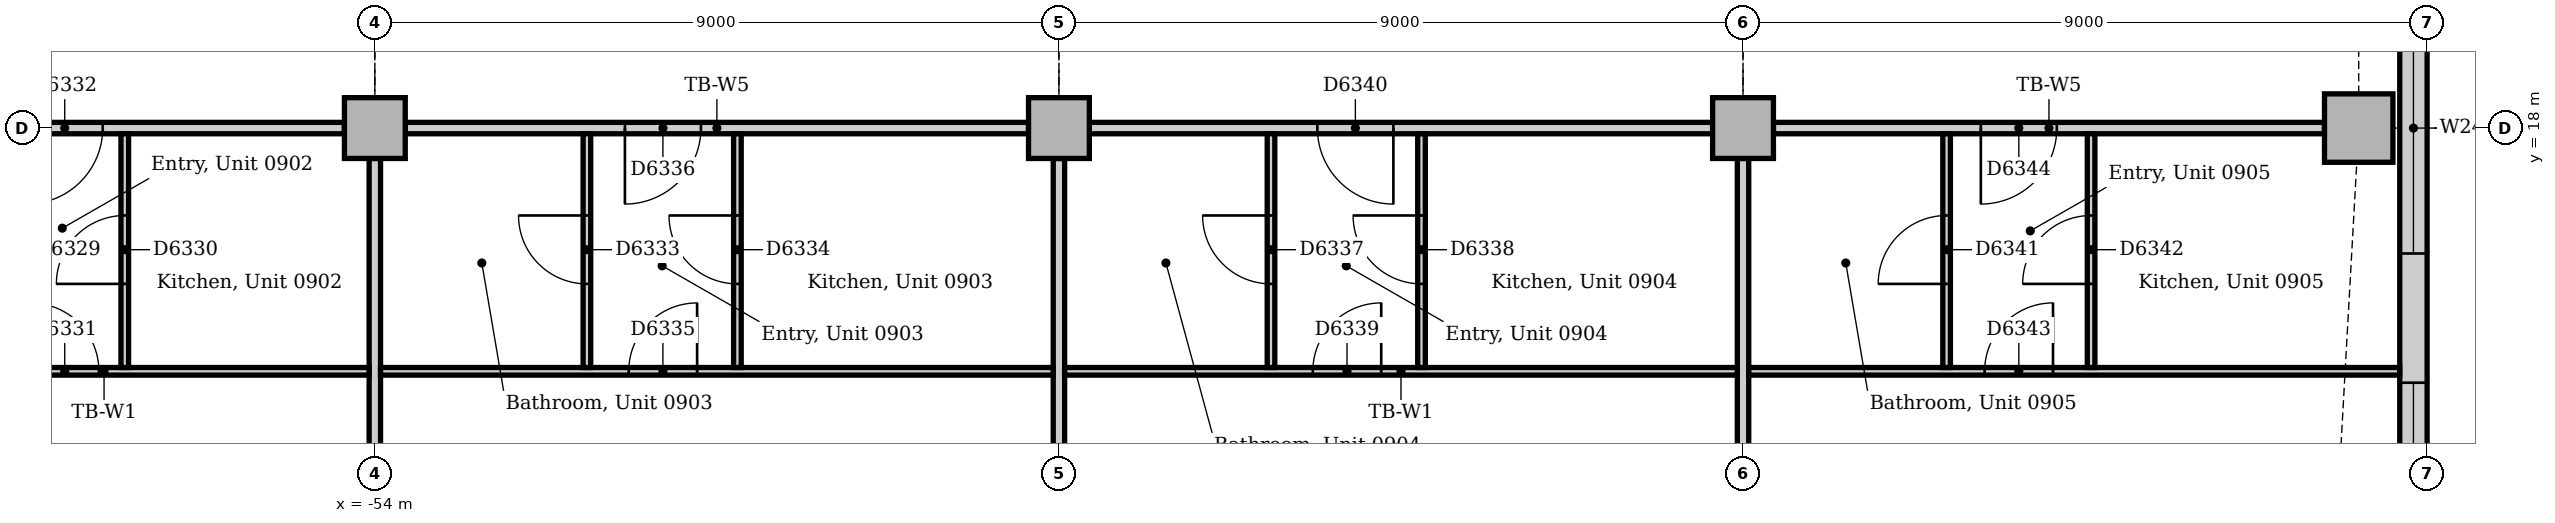
"""IFC4 building model, lengths in metres.
Left out: names, types, materials, properties, quantities, classifications, styles, units other than length and angle.
Written with IfcOpenShell. Run it as: python <this file> out.ifc"""

import sys

from ifc_helpers import new_model, si_unit, direction, frame, frame_2d, origin, origin_2d, place, context, subcontext, project, spatial, rectangle, extrude, element, fill, save


model = new_model("IFC4")
c1 = context("Model", 3, precision=1e-05, world=origin(), true_north=direction((0.0, 1.0)))
c2 = subcontext(c1, "Body", "Model", "MODEL_VIEW")
j1 = project(units=[si_unit("LENGTHUNIT", "METRE"), si_unit("PLANEANGLEUNIT", "RADIAN")], contexts=[c1])
p1 = place(None, origin())
s1 = spatial("IfcSite", under=j1, at=p1, CompositionType="ELEMENT")
p2 = place(p1, origin())
s2 = spatial("IfcBuilding", under=s1, at=p2, CompositionType="ELEMENT")
p3 = place(p2, frame((0.0, 0.0, 42.0)))
s3 = spatial("IfcBuildingStorey", under=s2, at=p3, CompositionType="ELEMENT", Elevation=42.0)
p4 = place(p3, frame((-27.9, 18.0, 0.0), z_axis=(0.0, 0.0, 1.0), x_axis=(1.0, 0.0, 0.0)))
e1 = element("IfcColumn", 1, at=p4, inside=s3, PredefinedType="COLUMN", context=c2, shape_type="SweptSolid", body=[
    extrude(rectangle(XDim=0.9, YDim=0.9, at=origin_2d()), origin(), (0.0, 0.0, 1.0), 3.7),
])
for number, where, z_axis, x_axis in (
    (2, (-54.0, 18.0, 0.0), (0.0, 0.0, 1.0), (1.0, 0.0, 0.0)),
    (3, (-45.0, 18.0, 0.0), (0.0, 0.0, 1.0), (1.0, 0.0, 0.0)),
    (4, (-36.0, 18.0, 0.0), (0.0, 0.0, 1.0), (1.0, 0.0, 0.0)),
):
    element("IfcColumn", number, at=place(p3, frame(where, z_axis=z_axis, x_axis=x_axis)), inside=s3, PredefinedType="COLUMN", context=c2, shape_type="SweptSolid", body=[
        extrude(rectangle(XDim=0.8, YDim=0.8, at=origin_2d()), origin(), (0.0, 0.0, 1.0), 3.7),
    ])
p5 = place(p3, frame((-27.18, 8.743, 0.0), z_axis=(0.0, 0.0, 1.0), x_axis=(0.0, 1.0, 0.0)))
e5 = element("IfcWall", 5, at=p5, inside=s3, PredefinedType="STANDARD", context=c2, shape_type="SweptSolid", body=[
    extrude(rectangle(XDim=12.257, YDim=0.36, at=frame_2d((6.129, 0.0))), origin(), (0.0, 0.0, 1.0), 3.7),
])
p6 = place(p5, frame((2.607, 0.0, 0.9)))
e6 = element("IfcOpeningElement", 6, at=p6, cuts=e5, PredefinedType="OPENING", context=c2, shape_type="SweptSolid", body=[
    extrude(rectangle(XDim=3.3, YDim=1.6, at=frame_2d((1.65, 0.8))), frame((0.0, 0.19, 0.0), z_axis=(0.0, -1.0, 0.0), x_axis=(1.0, 0.0, 0.0)), (0.0, 0.0, 1.0), 0.38),
])
p7 = place(p5, frame((7.607, 0.0, 0.9)))
e7 = element("IfcOpeningElement", 7, at=p7, cuts=e5, PredefinedType="OPENING", context=c2, shape_type="SweptSolid", body=[
    extrude(rectangle(XDim=3.3, YDim=1.6, at=frame_2d((1.65, 0.8))), frame((0.0, 0.19, 0.0), z_axis=(0.0, -1.0, 0.0), x_axis=(1.0, 0.0, 0.0)), (0.0, 0.0, 1.0), 0.38),
])
p8 = place(p3, frame((-35.6, 18.0, 0.0), z_axis=(0.0, 0.0, 1.0), x_axis=(1.0, 0.0, 0.0)))
e8 = element("IfcWall", 8, at=p8, inside=s3, PredefinedType="PARTITIONING", context=c2, shape_type="SweptSolid", body=[
    extrude(rectangle(XDim=7.25, YDim=0.15, at=frame_2d((3.625, 0.0))), origin(), (0.0, 0.0, 1.0), 3.0),
])
p9 = place(p8, frame((2.728, 0.0, 0.0)))
e9 = element("IfcOpeningElement", 9, at=p9, cuts=e8, PredefinedType="OPENING", context=c2, shape_type="SweptSolid", body=[
    extrude(rectangle(XDim=1.0, YDim=2.1, at=frame_2d((0.5, 1.05))), frame((0.0, 0.085, 0.0), z_axis=(0.0, -1.0, 0.0), x_axis=(1.0, 0.0, 0.0)), (0.0, 0.0, 1.0), 0.17),
])
p10 = place(p3, frame((-44.6, 18.0, 0.0), z_axis=(0.0, 0.0, 1.0), x_axis=(1.0, 0.0, 0.0)))
e10 = element("IfcWall", 10, at=p10, inside=s3, PredefinedType="PARTITIONING", context=c2, shape_type="SweptSolid", body=[
    extrude(rectangle(XDim=8.2, YDim=0.15, at=frame_2d((4.1, 0.0))), origin(), (0.0, 0.0, 1.0), 3.0),
])
p11 = place(p10, frame((3.0, 0.0, 0.0)))
e11 = element("IfcOpeningElement", 11, at=p11, cuts=e10, PredefinedType="OPENING", context=c2, shape_type="SweptSolid", body=[
    extrude(rectangle(XDim=1.0, YDim=2.1, at=frame_2d((0.5, 1.05))), frame((0.0, 0.085, 0.0), z_axis=(0.0, -1.0, 0.0), x_axis=(1.0, 0.0, 0.0)), (0.0, 0.0, 1.0), 0.17),
])
p12 = place(p3, frame((-53.6, 18.0, 0.0), z_axis=(0.0, 0.0, 1.0), x_axis=(1.0, 0.0, 0.0)))
e12 = element("IfcWall", 12, at=p12, inside=s3, PredefinedType="PARTITIONING", context=c2, shape_type="SweptSolid", body=[
    extrude(rectangle(XDim=8.2, YDim=0.15, at=frame_2d((4.1, 0.0))), origin(), (0.0, 0.0, 1.0), 3.0),
])
p13 = place(p12, frame((2.89, 0.0, 0.0)))
e13 = element("IfcOpeningElement", 13, at=p13, cuts=e12, PredefinedType="OPENING", context=c2, shape_type="SweptSolid", body=[
    extrude(rectangle(XDim=1.0, YDim=2.1, at=frame_2d((0.5, 1.05))), frame((0.0, 0.085, 0.0), z_axis=(0.0, -1.0, 0.0), x_axis=(1.0, 0.0, 0.0)), (0.0, 0.0, 1.0), 0.17),
])
p14 = place(p3, frame((-62.6, 18.0, 0.0), z_axis=(0.0, 0.0, 1.0), x_axis=(1.0, 0.0, 0.0)))
e14 = element("IfcWall", 14, at=p14, inside=s3, PredefinedType="PARTITIONING", context=c2, shape_type="SweptSolid", body=[
    extrude(rectangle(XDim=8.2, YDim=0.15, at=frame_2d((4.1, 0.0))), origin(), (0.0, 0.0, 1.0), 3.0),
])
p15 = place(p14, frame((0.4, 0.0, 0.0)))
e15 = element("IfcOpeningElement", 15, at=p15, cuts=e14, PredefinedType="OPENING", context=c2, shape_type="SweptSolid", body=[
    extrude(rectangle(XDim=0.9, YDim=2.1, at=frame_2d((0.45, 1.05))), frame((0.0, 0.085, 0.0), z_axis=(0.0, -1.0, 0.0), x_axis=(1.0, 0.0, 0.0)), (0.0, 0.0, 1.0), 0.17),
])
p16 = place(p14, frame((4.02, 0.0, 0.0)))
e16 = element("IfcOpeningElement", 16, at=p16, cuts=e14, PredefinedType="OPENING", context=c2, shape_type="SweptSolid", body=[
    extrude(rectangle(XDim=1.0, YDim=2.1, at=frame_2d((0.5, 1.05))), frame((0.0, 0.085, 0.0), z_axis=(0.0, -1.0, 0.0), x_axis=(1.0, 0.0, 0.0)), (0.0, 0.0, 1.0), 0.17),
])
for number, where, z_axis, x_axis in (
    (17, (-54.0, 9.4, 0.0), (0.0, 0.0, 1.0), (0.0, 1.0, 0.0)),
    (18, (-45.0, 9.4, 0.0), (0.0, 0.0, 1.0), (0.0, 1.0, 0.0)),
    (19, (-36.0, 9.4, 0.0), (0.0, 0.0, 1.0), (0.0, 1.0, 0.0)),
):
    element("IfcWall", number, at=place(p3, frame(where, z_axis=z_axis, x_axis=x_axis)), inside=s3, PredefinedType="PARTITIONING", context=c2, shape_type="SweptSolid", body=[
        extrude(rectangle(XDim=8.2, YDim=0.15, at=frame_2d((4.1, 0.0))), origin(), (0.0, 0.0, 1.0), 3.008),
    ])
p17 = place(p3, frame((-61.05, 14.8, 0.0), z_axis=(0.0, 0.0, 1.0), x_axis=(1.0, 0.0, 0.0)))
e20 = element("IfcWall", 20, at=p17, inside=s3, PredefinedType="PARTITIONING", context=c2, shape_type="SweptSolid", body=[
    extrude(rectangle(XDim=6.975, YDim=0.1, at=frame_2d((3.487, 0.0))), origin(), (0.0, 0.0, 1.0), 3.7),
])
p18 = place(p17, frame((2.52, 0.0, 0.0)))
e21 = element("IfcOpeningElement", 21, at=p18, cuts=e20, PredefinedType="OPENING", context=c2, shape_type="SweptSolid", body=[
    extrude(rectangle(XDim=0.9, YDim=2.1, at=frame_2d((0.45, 1.05))), frame((0.0, 0.06, 0.0), z_axis=(0.0, -1.0, 0.0), x_axis=(1.0, 0.0, 0.0)), (0.0, 0.0, 1.0), 0.12),
])
p19 = place(p3, frame((-53.925, 14.8, 0.0), z_axis=(0.0, 0.0, 1.0), x_axis=(1.0, 0.0, 0.0)))
e22 = element("IfcWall", 22, at=p19, inside=s3, PredefinedType="PARTITIONING", context=c2, shape_type="SweptSolid", body=[
    extrude(rectangle(XDim=8.85, YDim=0.1, at=frame_2d((4.425, 0.0))), origin(), (0.0, 0.0, 1.0), 3.7),
])
p20 = place(p19, frame((3.265, 0.0, 0.0)))
e23 = element("IfcOpeningElement", 23, at=p20, cuts=e22, PredefinedType="OPENING", context=c2, shape_type="SweptSolid", body=[
    extrude(rectangle(XDim=0.9, YDim=2.1, at=frame_2d((0.45, 1.05))), frame((0.0, 0.06, 0.0), z_axis=(0.0, -1.0, 0.0), x_axis=(1.0, 0.0, 0.0)), (0.0, 0.0, 1.0), 0.12),
])
p21 = place(p3, frame((-44.925, 14.8, 0.0), z_axis=(0.0, 0.0, 1.0), x_axis=(1.0, 0.0, 0.0)))
e24 = element("IfcWall", 24, at=p21, inside=s3, PredefinedType="PARTITIONING", context=c2, shape_type="SweptSolid", body=[
    extrude(rectangle(XDim=8.85, YDim=0.1, at=frame_2d((4.425, 0.0))), origin(), (0.0, 0.0, 1.0), 3.7),
])
p22 = place(p21, frame((3.265, 0.0, 0.0)))
e25 = element("IfcOpeningElement", 25, at=p22, cuts=e24, PredefinedType="OPENING", context=c2, shape_type="SweptSolid", body=[
    extrude(rectangle(XDim=0.9, YDim=2.1, at=frame_2d((0.45, 1.05))), frame((0.0, 0.06, 0.0), z_axis=(0.0, -1.0, 0.0), x_axis=(1.0, 0.0, 0.0)), (0.0, 0.0, 1.0), 0.12),
])
p23 = place(p3, frame((-35.925, 14.8, 0.0), z_axis=(0.0, 0.0, 1.0), x_axis=(1.0, 0.0, 0.0)))
e26 = element("IfcWall", 26, at=p23, inside=s3, PredefinedType="PARTITIONING", context=c2, shape_type="SweptSolid", body=[
    extrude(rectangle(XDim=8.565, YDim=0.1, at=frame_2d((4.282, 0.0))), origin(), (0.0, 0.0, 1.0), 3.7),
])
p24 = place(p23, frame((3.103, 0.0, 0.0)))
e27 = element("IfcOpeningElement", 27, at=p24, cuts=e26, PredefinedType="OPENING", context=c2, shape_type="SweptSolid", body=[
    extrude(rectangle(XDim=0.9, YDim=2.1, at=frame_2d((0.45, 1.05))), frame((0.0, 0.06, 0.0), z_axis=(0.0, -1.0, 0.0), x_axis=(1.0, 0.0, 0.0)), (0.0, 0.0, 1.0), 0.12),
])
p25 = place(p3, frame((-57.29, 14.85, 0.0), z_axis=(0.0, 0.0, 1.0), x_axis=(0.0, 1.0, 0.0)))
e28 = element("IfcWall", 28, at=p25, inside=s3, PredefinedType="PARTITIONING", context=c2, shape_type="SweptSolid", body=[
    extrude(rectangle(XDim=3.075, YDim=0.1, at=frame_2d((1.538, 0.0))), origin(), (0.0, 0.0, 1.0), 3.7),
])
p26 = place(p25, frame((1.1, 0.0, 0.0)))
e29 = element("IfcOpeningElement", 29, at=p26, cuts=e28, PredefinedType="OPENING", context=c2, shape_type="SweptSolid", body=[
    extrude(rectangle(XDim=0.9, YDim=2.1, at=frame_2d((0.45, 1.05))), frame((0.0, 0.06, 0.0), z_axis=(0.0, -1.0, 0.0), x_axis=(1.0, 0.0, 0.0)), (0.0, 0.0, 1.0), 0.12),
])
p27 = place(p3, frame((-51.21, 14.85, 0.0), z_axis=(0.0, 0.0, 1.0), x_axis=(0.0, 1.0, 0.0)))
e30 = element("IfcWall", 30, at=p27, inside=s3, PredefinedType="PARTITIONING", context=c2, shape_type="SweptSolid", body=[
    extrude(rectangle(XDim=3.075, YDim=0.1, at=frame_2d((1.538, 0.0))), origin(), (0.0, 0.0, 1.0), 3.7),
])
p28 = place(p27, frame((1.1, 0.0, 0.0)))
e31 = element("IfcOpeningElement", 31, at=p28, cuts=e30, PredefinedType="OPENING", context=c2, shape_type="SweptSolid", body=[
    extrude(rectangle(XDim=0.9, YDim=2.1, at=frame_2d((0.45, 1.05))), frame((0.0, 0.06, 0.0), z_axis=(0.0, -1.0, 0.0), x_axis=(1.0, 0.0, 0.0)), (0.0, 0.0, 1.0), 0.12),
])
p29 = place(p3, frame((-49.23, 14.85, 0.0), z_axis=(0.0, 0.0, 1.0), x_axis=(0.0, 1.0, 0.0)))
e32 = element("IfcWall", 32, at=p29, inside=s3, PredefinedType="PARTITIONING", context=c2, shape_type="SweptSolid", body=[
    extrude(rectangle(XDim=3.075, YDim=0.1, at=frame_2d((1.538, 0.0))), origin(), (0.0, 0.0, 1.0), 3.7),
])
p30 = place(p29, frame((1.1, 0.0, 0.0)))
e33 = element("IfcOpeningElement", 33, at=p30, cuts=e32, PredefinedType="OPENING", context=c2, shape_type="SweptSolid", body=[
    extrude(rectangle(XDim=0.9, YDim=2.1, at=frame_2d((0.45, 1.05))), frame((0.0, 0.06, 0.0), z_axis=(0.0, -1.0, 0.0), x_axis=(1.0, 0.0, 0.0)), (0.0, 0.0, 1.0), 0.12),
])
p31 = place(p3, frame((-42.21, 14.85, 0.0), z_axis=(0.0, 0.0, 1.0), x_axis=(0.0, 1.0, 0.0)))
e34 = element("IfcWall", 34, at=p31, inside=s3, PredefinedType="PARTITIONING", context=c2, shape_type="SweptSolid", body=[
    extrude(rectangle(XDim=3.075, YDim=0.1, at=frame_2d((1.538, 0.0))), origin(), (0.0, 0.0, 1.0), 3.7),
])
p32 = place(p31, frame((1.1, 0.0, 0.0)))
e35 = element("IfcOpeningElement", 35, at=p32, cuts=e34, PredefinedType="OPENING", context=c2, shape_type="SweptSolid", body=[
    extrude(rectangle(XDim=0.9, YDim=2.1, at=frame_2d((0.45, 1.05))), frame((0.0, 0.06, 0.0), z_axis=(0.0, -1.0, 0.0), x_axis=(1.0, 0.0, 0.0)), (0.0, 0.0, 1.0), 0.12),
])
p33 = place(p3, frame((-40.23, 14.85, 0.0), z_axis=(0.0, 0.0, 1.0), x_axis=(0.0, 1.0, 0.0)))
e36 = element("IfcWall", 36, at=p33, inside=s3, PredefinedType="PARTITIONING", context=c2, shape_type="SweptSolid", body=[
    extrude(rectangle(XDim=3.075, YDim=0.1, at=frame_2d((1.538, 0.0))), origin(), (0.0, 0.0, 1.0), 3.7),
])
p34 = place(p33, frame((1.1, 0.0, 0.0)))
e37 = element("IfcOpeningElement", 37, at=p34, cuts=e36, PredefinedType="OPENING", context=c2, shape_type="SweptSolid", body=[
    extrude(rectangle(XDim=0.9, YDim=2.1, at=frame_2d((0.45, 1.05))), frame((0.0, 0.06, 0.0), z_axis=(0.0, -1.0, 0.0), x_axis=(1.0, 0.0, 0.0)), (0.0, 0.0, 1.0), 0.12),
])
p35 = place(p3, frame((-33.322, 14.85, 0.0), z_axis=(0.0, 0.0, 1.0), x_axis=(0.0, 1.0, 0.0)))
e38 = element("IfcWall", 38, at=p35, inside=s3, PredefinedType="PARTITIONING", context=c2, shape_type="SweptSolid", body=[
    extrude(rectangle(XDim=3.075, YDim=0.1, at=frame_2d((1.538, 0.0))), origin(), (0.0, 0.0, 1.0), 3.7),
])
p36 = place(p35, frame((1.1, 0.0, 0.0)))
e39 = element("IfcOpeningElement", 39, at=p36, cuts=e38, PredefinedType="OPENING", context=c2, shape_type="SweptSolid", body=[
    extrude(rectangle(XDim=0.9, YDim=2.1, at=frame_2d((0.45, 1.05))), frame((0.0, 0.06, 0.0), z_axis=(0.0, -1.0, 0.0), x_axis=(1.0, 0.0, 0.0)), (0.0, 0.0, 1.0), 0.12),
])
p37 = place(p3, frame((-31.421, 14.85, 0.0), z_axis=(0.0, 0.0, 1.0), x_axis=(0.0, 1.0, 0.0)))
e40 = element("IfcWall", 40, at=p37, inside=s3, PredefinedType="PARTITIONING", context=c2, shape_type="SweptSolid", body=[
    extrude(rectangle(XDim=3.075, YDim=0.1, at=frame_2d((1.538, 0.0))), origin(), (0.0, 0.0, 1.0), 3.7),
])
p38 = place(p37, frame((1.1, 0.0, 0.0)))
e41 = element("IfcOpeningElement", 41, at=p38, cuts=e40, PredefinedType="OPENING", context=c2, shape_type="SweptSolid", body=[
    extrude(rectangle(XDim=0.9, YDim=2.1, at=frame_2d((0.45, 1.05))), frame((0.0, 0.06, 0.0), z_axis=(0.0, -1.0, 0.0), x_axis=(1.0, 0.0, 0.0)), (0.0, 0.0, 1.0), 0.12),
])
p39 = place(p6, origin())
e42 = element("IfcWindow", 42, at=p39, inside=s3, PartitioningType="SINGLE_PANEL", PredefinedType="WINDOW", context=c2, shape_type="SweptSolid", body=[
    extrude(rectangle(XDim=3.3, YDim=1.6, at=frame_2d((1.65, 0.8))), frame((0.0, 0.13, 0.0), z_axis=(0.0, -1.0, 0.0), x_axis=(1.0, 0.0, 0.0)), (0.0, 0.0, 1.0), 0.06),
])
fill(e6, e42)
p40 = place(p7, origin())
e43 = element("IfcWindow", 43, at=p40, inside=s3, PartitioningType="SINGLE_PANEL", PredefinedType="WINDOW", context=c2, shape_type="SweptSolid", body=[
    extrude(rectangle(XDim=3.3, YDim=1.6, at=frame_2d((1.65, 0.8))), frame((0.0, 0.13, 0.0), z_axis=(0.0, -1.0, 0.0), x_axis=(1.0, 0.0, 0.0)), (0.0, 0.0, 1.0), 0.06),
])
fill(e7, e43)
p41 = place(p26, origin())
e44 = element("IfcDoor", 44, at=p41, inside=s3, OperationType="SINGLE_SWING_LEFT", PredefinedType="DOOR", context=c2, shape_type="SweptSolid", body=[
    extrude(rectangle(XDim=0.9, YDim=2.1, at=frame_2d((0.45, 1.05))), frame((0.0, 0.025, 0.0), z_axis=(0.0, -1.0, 0.0), x_axis=(1.0, 0.0, 0.0)), (0.0, 0.0, 1.0), 0.05),
])
fill(e29, e44)
p42 = place(p18, origin())
e45 = element("IfcDoor", 45, at=p42, inside=s3, OperationType="SINGLE_SWING_LEFT", PredefinedType="DOOR", context=c2, shape_type="SweptSolid", body=[
    extrude(rectangle(XDim=0.9, YDim=2.1, at=frame_2d((0.45, 1.05))), frame((0.0, 0.025, 0.0), z_axis=(0.0, -1.0, 0.0), x_axis=(1.0, 0.0, 0.0)), (0.0, 0.0, 1.0), 0.05),
])
fill(e21, e45)
p43 = place(p16, frame((1.0, 0.0, 0.0), z_axis=(0.0, 0.0, 1.0), x_axis=(-1.0, 0.0, 0.0)))
e46 = element("IfcDoor", 46, at=p43, inside=s3, OperationType="SINGLE_SWING_RIGHT", PredefinedType="DOOR", context=c2, shape_type="SweptSolid", body=[
    extrude(rectangle(XDim=1.0, YDim=2.1, at=frame_2d((0.5, 1.05))), frame((0.0, 0.025, 0.0), z_axis=(0.0, -1.0, 0.0), x_axis=(1.0, 0.0, 0.0)), (0.0, 0.0, 1.0), 0.05),
])
fill(e16, e46)
p44 = place(p28, origin())
e47 = element("IfcDoor", 47, at=p44, inside=s3, OperationType="SINGLE_SWING_RIGHT", PredefinedType="DOOR", context=c2, shape_type="SweptSolid", body=[
    extrude(rectangle(XDim=0.9, YDim=2.1, at=frame_2d((0.45, 1.05))), frame((0.0, 0.025, 0.0), z_axis=(0.0, -1.0, 0.0), x_axis=(1.0, 0.0, 0.0)), (0.0, 0.0, 1.0), 0.05),
])
fill(e31, e47)
p45 = place(p30, origin())
e48 = element("IfcDoor", 48, at=p45, inside=s3, OperationType="SINGLE_SWING_RIGHT", PredefinedType="DOOR", context=c2, shape_type="SweptSolid", body=[
    extrude(rectangle(XDim=0.9, YDim=2.1, at=frame_2d((0.45, 1.05))), frame((0.0, 0.025, 0.0), z_axis=(0.0, -1.0, 0.0), x_axis=(1.0, 0.0, 0.0)), (0.0, 0.0, 1.0), 0.05),
])
fill(e33, e48)
p46 = place(p20, origin())
e49 = element("IfcDoor", 49, at=p46, inside=s3, OperationType="SINGLE_SWING_RIGHT", PredefinedType="DOOR", context=c2, shape_type="SweptSolid", body=[
    extrude(rectangle(XDim=0.9, YDim=2.1, at=frame_2d((0.45, 1.05))), frame((0.0, 0.025, 0.0), z_axis=(0.0, -1.0, 0.0), x_axis=(1.0, 0.0, 0.0)), (0.0, 0.0, 1.0), 0.05),
])
fill(e23, e49)
p47 = place(p13, frame((1.0, 0.0, 0.0), z_axis=(0.0, 0.0, 1.0), x_axis=(-1.0, 0.0, 0.0)))
e50 = element("IfcDoor", 50, at=p47, inside=s3, OperationType="SINGLE_SWING_RIGHT", PredefinedType="DOOR", context=c2, shape_type="SweptSolid", body=[
    extrude(rectangle(XDim=1.0, YDim=2.1, at=frame_2d((0.5, 1.05))), frame((0.0, 0.025, 0.0), z_axis=(0.0, -1.0, 0.0), x_axis=(1.0, 0.0, 0.0)), (0.0, 0.0, 1.0), 0.05),
])
fill(e13, e50)
p48 = place(p32, origin())
e51 = element("IfcDoor", 51, at=p48, inside=s3, OperationType="SINGLE_SWING_RIGHT", PredefinedType="DOOR", context=c2, shape_type="SweptSolid", body=[
    extrude(rectangle(XDim=0.9, YDim=2.1, at=frame_2d((0.45, 1.05))), frame((0.0, 0.025, 0.0), z_axis=(0.0, -1.0, 0.0), x_axis=(1.0, 0.0, 0.0)), (0.0, 0.0, 1.0), 0.05),
])
fill(e35, e51)
p49 = place(p34, origin())
e52 = element("IfcDoor", 52, at=p49, inside=s3, OperationType="SINGLE_SWING_RIGHT", PredefinedType="DOOR", context=c2, shape_type="SweptSolid", body=[
    extrude(rectangle(XDim=0.9, YDim=2.1, at=frame_2d((0.45, 1.05))), frame((0.0, 0.025, 0.0), z_axis=(0.0, -1.0, 0.0), x_axis=(1.0, 0.0, 0.0)), (0.0, 0.0, 1.0), 0.05),
])
fill(e37, e52)
p50 = place(p22, origin())
e53 = element("IfcDoor", 53, at=p50, inside=s3, OperationType="SINGLE_SWING_RIGHT", PredefinedType="DOOR", context=c2, shape_type="SweptSolid", body=[
    extrude(rectangle(XDim=0.9, YDim=2.1, at=frame_2d((0.45, 1.05))), frame((0.0, 0.025, 0.0), z_axis=(0.0, -1.0, 0.0), x_axis=(1.0, 0.0, 0.0)), (0.0, 0.0, 1.0), 0.05),
])
fill(e25, e53)
p51 = place(p11, frame((1.0, 0.0, 0.0), z_axis=(0.0, 0.0, 1.0), x_axis=(-1.0, 0.0, 0.0)))
e54 = element("IfcDoor", 54, at=p51, inside=s3, OperationType="SINGLE_SWING_LEFT", PredefinedType="DOOR", context=c2, shape_type="SweptSolid", body=[
    extrude(rectangle(XDim=1.0, YDim=2.1, at=frame_2d((0.5, 1.05))), frame((0.0, 0.025, 0.0), z_axis=(0.0, -1.0, 0.0), x_axis=(1.0, 0.0, 0.0)), (0.0, 0.0, 1.0), 0.05),
])
fill(e11, e54)
p52 = place(p36, origin())
e55 = element("IfcDoor", 55, at=p52, inside=s3, OperationType="SINGLE_SWING_LEFT", PredefinedType="DOOR", context=c2, shape_type="SweptSolid", body=[
    extrude(rectangle(XDim=0.9, YDim=2.1, at=frame_2d((0.45, 1.05))), frame((0.0, 0.025, 0.0), z_axis=(0.0, -1.0, 0.0), x_axis=(1.0, 0.0, 0.0)), (0.0, 0.0, 1.0), 0.05),
])
fill(e39, e55)
p53 = place(p38, origin())
e56 = element("IfcDoor", 56, at=p53, inside=s3, OperationType="SINGLE_SWING_LEFT", PredefinedType="DOOR", context=c2, shape_type="SweptSolid", body=[
    extrude(rectangle(XDim=0.9, YDim=2.1, at=frame_2d((0.45, 1.05))), frame((0.0, 0.025, 0.0), z_axis=(0.0, -1.0, 0.0), x_axis=(1.0, 0.0, 0.0)), (0.0, 0.0, 1.0), 0.05),
])
fill(e41, e56)
p54 = place(p24, origin())
e57 = element("IfcDoor", 57, at=p54, inside=s3, OperationType="SINGLE_SWING_RIGHT", PredefinedType="DOOR", context=c2, shape_type="SweptSolid", body=[
    extrude(rectangle(XDim=0.9, YDim=2.1, at=frame_2d((0.45, 1.05))), frame((0.0, 0.025, 0.0), z_axis=(0.0, -1.0, 0.0), x_axis=(1.0, 0.0, 0.0)), (0.0, 0.0, 1.0), 0.05),
])
fill(e27, e57)
p55 = place(p9, frame((1.0, 0.0, 0.0), z_axis=(0.0, 0.0, 1.0), x_axis=(-1.0, 0.0, 0.0)))
e58 = element("IfcDoor", 58, at=p55, inside=s3, OperationType="SINGLE_SWING_RIGHT", PredefinedType="DOOR", context=c2, shape_type="SweptSolid", body=[
    extrude(rectangle(XDim=1.0, YDim=2.1, at=frame_2d((0.5, 1.05))), frame((0.0, 0.025, 0.0), z_axis=(0.0, -1.0, 0.0), x_axis=(1.0, 0.0, 0.0)), (0.0, 0.0, 1.0), 0.05),
])
fill(e9, e58)
save(model, sys.argv[1])
